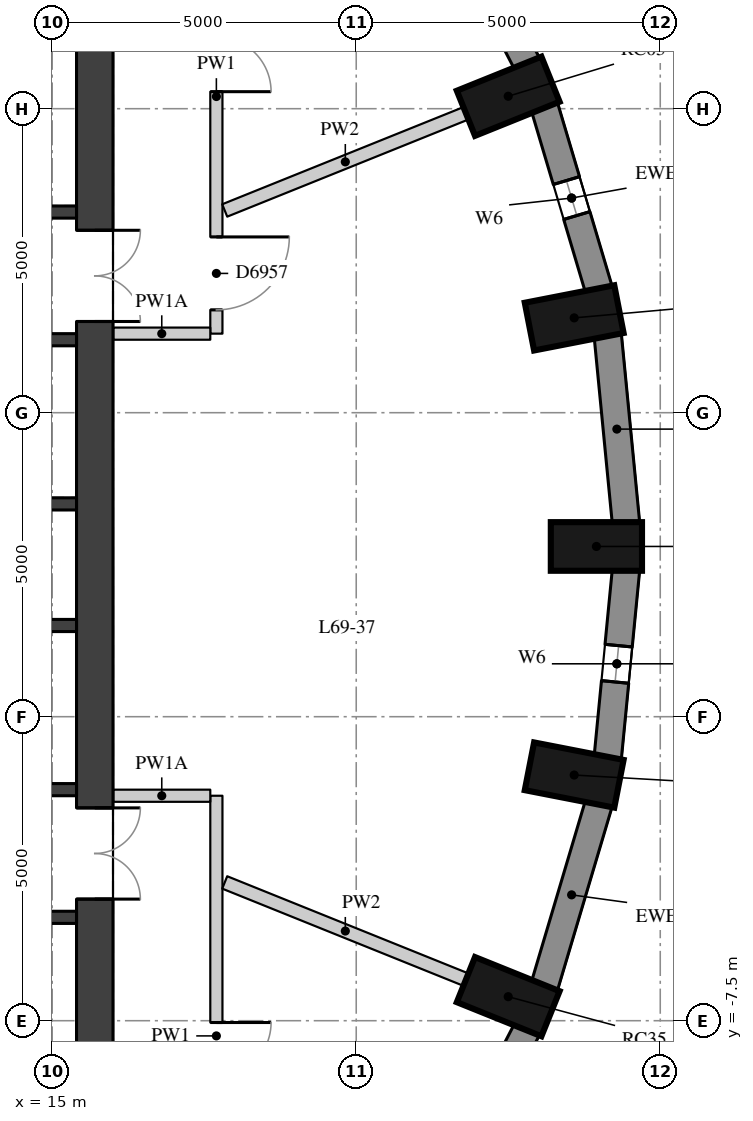
"""IFC4 building model, lengths in metres.
Left out: names, types, materials, properties, quantities, classifications, styles, units other than length and angle.
Written with IfcOpenShell. Run it as: python <this file> out.ifc"""

import sys

from ifc_helpers import new_model, si_unit, direction, frame, frame_2d, origin, origin_2d, place, context, subcontext, project, spatial, rectangle, extrude, element, fill, save


model = new_model("IFC4")
c1 = context("Model", 3, precision=1e-05, world=origin(), true_north=direction((0.0, 1.0)))
c2 = subcontext(c1, "Body", "Model", "MODEL_VIEW")
j1 = project(units=[si_unit("LENGTHUNIT", "METRE"), si_unit("PLANEANGLEUNIT", "RADIAN")], contexts=[c1])
p1 = place(None, origin())
s1 = spatial("IfcSite", under=j1, at=p1, CompositionType="ELEMENT")
p2 = place(p1, origin())
s2 = spatial("IfcBuilding", under=s1, at=p2, CompositionType="ELEMENT")
p3 = place(p2, frame((0.0, 0.0, 243.2)))
s3 = spatial("IfcBuildingStorey", under=s2, at=p3, CompositionType="ELEMENT", Elevation=243.2)
for number, where, z_axis, x_axis in (
    (1, (23.95, 0.3, 0.0), (0.0, 0.0, 1.0), (1.0, 0.0, 0.0)),
    (2, (23.585, 4.06, 0.0), (0.0, 0.0, 1.0), (0.981, 0.192, 0.0)),
    (3, (22.5, 7.705, 0.0), (0.0, 0.0, 1.0), (0.928, 0.374, 0.0)),
    (4, (22.5, -7.105, 0.0), (0.0, 0.0, 1.0), (0.928, -0.374, 0.0)),
    (5, (23.585, -3.459, 0.0), (0.0, 0.0, 1.0), (0.981, -0.192, 0.0)),
):
    element("IfcColumn", number, at=place(p3, frame(where, z_axis=z_axis, x_axis=x_axis)), inside=s3, PredefinedType="COLUMN", context=c2, shape_type="SweptSolid", body=[
        extrude(rectangle(XDim=1.5, YDim=0.8, at=origin_2d()), origin(), (0.0, 0.0, 1.0), 3.3),
    ])
p4 = place(p3, frame((24.437, 0.68, 0.0), z_axis=(0.0, 0.0, 1.0), x_axis=(-0.096740086873, 0.995309678237, 0.0)))
e6 = element("IfcWall", 6, at=p4, inside=s3, PredefinedType="SOLIDWALL", context=c2, shape_type="SweptSolid", body=[
    extrude(rectangle(XDim=3.114, YDim=0.45, at=frame_2d((1.557, 0.0))), origin(), (0.0, 0.0, 1.0), 3.02),
])
p5 = place(p3, frame((23.99, 4.526, 0.0), z_axis=(0.0, 0.0, 1.0), x_axis=(-0.285263800865, 0.958449040855, 0.0)))
e7 = element("IfcWall", 7, at=p5, inside=s3, PredefinedType="SOLIDWALL", context=c2, shape_type="SweptSolid", body=[
    extrude(rectangle(XDim=3.139, YDim=0.45, at=frame_2d((1.57, 0.0))), origin(), (0.0, 0.0, 1.0), 3.02),
])
p6 = place(p5, frame((1.27, 0.0, 0.4)))
e8 = element("IfcOpeningElement", 8, at=p6, cuts=e7, PredefinedType="OPENING", context=c2, shape_type="SweptSolid", body=[
    extrude(rectangle(XDim=0.6, YDim=1.75, at=frame_2d((0.3, 0.875))), frame((0.0, 0.235, 0.0), z_axis=(0.0, -1.0, 0.0), x_axis=(1.0, 0.0, 0.0)), (0.0, 0.0, 1.0), 0.47),
])
p7 = place(p3, frame((22.81, 8.24, 0.0), z_axis=(0.0, 0.0, 1.0), x_axis=(-0.459889857669, 0.887975967475, 0.0)))
e9 = element("IfcWall", 9, at=p7, inside=s3, PredefinedType="SOLIDWALL", context=c2, shape_type="SweptSolid", body=[
    extrude(rectangle(XDim=3.186, YDim=0.45, at=frame_2d((1.593, 0.0))), origin(), (0.0, 0.0, 1.0), 3.02),
])
p8 = place(p3, frame((21.345, -10.468, 0.0), z_axis=(0.0, 0.0, 1.0), x_axis=(0.459921155255, 0.887959757505, 0.0)))
e10 = element("IfcWall", 10, at=p8, inside=s3, PredefinedType="SOLIDWALL", context=c2, shape_type="SweptSolid", body=[
    extrude(rectangle(XDim=3.186, YDim=0.45, at=frame_2d((1.593, 0.0))), origin(), (0.0, 0.0, 1.0), 3.02),
])
p9 = place(p8, frame((1.293, 0.0, 0.4)))
e11 = element("IfcOpeningElement", 11, at=p9, cuts=e10, PredefinedType="OPENING", context=c2, shape_type="SweptSolid", body=[
    extrude(rectangle(XDim=0.6, YDim=1.75, at=frame_2d((0.3, 0.875))), frame((0.0, 0.235, 0.0), z_axis=(0.0, -1.0, 0.0), x_axis=(1.0, 0.0, 0.0)), (0.0, 0.0, 1.0), 0.47),
])
p10 = place(p3, frame((23.094, -6.935, 0.0), z_axis=(0.0, 0.0, 1.0), x_axis=(0.285263800865, 0.958449040855, 0.0)))
e12 = element("IfcWall", 12, at=p10, inside=s3, PredefinedType="SOLIDWALL", context=c2, shape_type="SweptSolid", body=[
    extrude(rectangle(XDim=3.139, YDim=0.45, at=frame_2d((1.57, 0.0))), origin(), (0.0, 0.0, 1.0), 3.02),
])
p11 = place(p3, frame((24.136, -3.18, 0.0), z_axis=(0.0, 0.0, 1.0), x_axis=(0.09673253904, 0.995310411827, 0.0)))
e13 = element("IfcWall", 13, at=p11, inside=s3, PredefinedType="SOLIDWALL", context=c2, shape_type="SweptSolid", body=[
    extrude(rectangle(XDim=3.115, YDim=0.45, at=frame_2d((1.557, 0.0))), origin(), (0.0, 0.0, 1.0), 3.02),
])
p12 = place(p11, frame((1.257, 0.0, 0.4)))
e14 = element("IfcOpeningElement", 14, at=p12, cuts=e13, PredefinedType="OPENING", context=c2, shape_type="SweptSolid", body=[
    extrude(rectangle(XDim=0.6, YDim=1.75, at=frame_2d((0.3, 0.875))), frame((0.0, 0.235, 0.0), z_axis=(0.0, -1.0, 0.0), x_axis=(1.0, 0.0, 0.0)), (0.0, 0.0, 1.0), 0.47),
])
p13 = place(p3, frame((15.7, -9.4, 0.0), z_axis=(0.0, 0.0, 1.0), x_axis=(0.0, 1.0, 0.0)))
e15 = element("IfcWall", 15, at=p13, inside=s3, PredefinedType="SHEAR", context=c2, shape_type="SweptSolid", body=[
    extrude(rectangle(XDim=18.8, YDim=0.6, at=frame_2d((9.4, 0.0))), origin(), (0.0, 0.0, 1.0), 3.02),
])
p14 = place(p13, frame((13.4, 0.0, 0.0)))
e16 = element("IfcOpeningElement", 16, at=p14, cuts=e15, PredefinedType="OPENING", context=c2, shape_type="SweptSolid", body=[
    extrude(rectangle(XDim=1.5, YDim=2.1, at=frame_2d((0.75, 1.05))), frame((0.0, 0.31, 0.0), z_axis=(0.0, -1.0, 0.0), x_axis=(1.0, 0.0, 0.0)), (0.0, 0.0, 1.0), 0.62),
])
p15 = place(p13, frame((3.9, 0.0, 0.0)))
e17 = element("IfcOpeningElement", 17, at=p15, cuts=e15, PredefinedType="OPENING", context=c2, shape_type="SweptSolid", body=[
    extrude(rectangle(XDim=1.5, YDim=2.1, at=frame_2d((0.75, 1.05))), frame((0.0, 0.31, 0.0), z_axis=(0.0, -1.0, 0.0), x_axis=(1.0, 0.0, 0.0)), (0.0, 0.0, 1.0), 0.62),
])
p16 = place(p3, frame((4.6, 5.8, 0.0), z_axis=(0.0, 0.0, 1.0), x_axis=(1.0, 0.0, 0.0)))
e18 = element("IfcWall", 18, at=p16, inside=s3, PredefinedType="SHEAR", context=c2, shape_type="SweptSolid", body=[
    extrude(rectangle(XDim=10.8, YDim=0.2, at=frame_2d((5.4, 0.0))), origin(), (0.0, 0.0, 1.0), 3.02),
])
p17 = place(p16, frame((7.05, 0.0, 0.0)))
e19 = element("IfcOpeningElement", 19, at=p17, cuts=e18, PredefinedType="OPENING", context=c2, shape_type="SweptSolid", body=[
    extrude(rectangle(XDim=1.1, YDim=2.1, at=frame_2d((0.55, 1.05))), frame((0.0, 0.11, 0.0), z_axis=(0.0, -1.0, 0.0), x_axis=(1.0, 0.0, 0.0)), (0.0, 0.0, 1.0), 0.22),
])
p18 = place(p16, frame((9.05, 0.0, 0.0)))
e20 = element("IfcOpeningElement", 20, at=p18, cuts=e18, PredefinedType="OPENING", context=c2, shape_type="SweptSolid", body=[
    extrude(rectangle(XDim=1.1, YDim=2.1, at=frame_2d((0.55, 1.05))), frame((0.0, 0.11, 0.0), z_axis=(0.0, -1.0, 0.0), x_axis=(1.0, 0.0, 0.0)), (0.0, 0.0, 1.0), 0.22),
])
p19 = place(p3, frame((4.6, 3.7, 0.0), z_axis=(0.0, 0.0, 1.0), x_axis=(1.0, 0.0, 0.0)))
e21 = element("IfcWall", 21, at=p19, inside=s3, PredefinedType="SHEAR", context=c2, shape_type="SweptSolid", body=[
    extrude(rectangle(XDim=10.8, YDim=0.2, at=frame_2d((5.4, 0.0))), origin(), (0.0, 0.0, 1.0), 3.02),
])
p20 = place(p19, frame((6.6, 0.0, 0.0)))
e22 = element("IfcOpeningElement", 22, at=p20, cuts=e21, PredefinedType="OPENING", context=c2, shape_type="SweptSolid", body=[
    extrude(rectangle(XDim=1.1, YDim=2.1, at=frame_2d((0.55, 1.05))), frame((0.0, 0.11, 0.0), z_axis=(0.0, -1.0, 0.0), x_axis=(1.0, 0.0, 0.0)), (0.0, 0.0, 1.0), 0.22),
])
p21 = place(p19, frame((8.9, 0.0, 0.0)))
e23 = element("IfcOpeningElement", 23, at=p21, cuts=e21, PredefinedType="OPENING", context=c2, shape_type="SweptSolid", body=[
    extrude(rectangle(XDim=1.1, YDim=2.1, at=frame_2d((0.55, 1.05))), frame((0.0, 0.11, 0.0), z_axis=(0.0, -1.0, 0.0), x_axis=(1.0, 0.0, 0.0)), (0.0, 0.0, 1.0), 0.22),
])
for number, where, z_axis, x_axis in (
    (24, (4.6, 1.0, 0.0), (0.0, 0.0, 1.0), (1.0, 0.0, 0.0)),
    (25, (4.6, -1.0, 0.0), (0.0, 0.0, 1.0), (1.0, 0.0, 0.0)),
):
    element("IfcWall", number, at=place(p3, frame(where, z_axis=z_axis, x_axis=x_axis)), inside=s3, PredefinedType="SHEAR", context=c2, shape_type="SweptSolid", body=[
        extrude(rectangle(XDim=10.8, YDim=0.2, at=frame_2d((5.4, 0.0))), origin(), (0.0, 0.0, 1.0), 3.02),
    ])
p22 = place(p3, frame((4.6, -3.7, 0.0), z_axis=(0.0, 0.0, 1.0), x_axis=(1.0, 0.0, 0.0)))
e26 = element("IfcWall", 26, at=p22, inside=s3, PredefinedType="SHEAR", context=c2, shape_type="SweptSolid", body=[
    extrude(rectangle(XDim=10.8, YDim=0.2, at=frame_2d((5.4, 0.0))), origin(), (0.0, 0.0, 1.0), 3.02),
])
p23 = place(p22, frame((6.6, 0.0, 0.0)))
e27 = element("IfcOpeningElement", 27, at=p23, cuts=e26, PredefinedType="OPENING", context=c2, shape_type="SweptSolid", body=[
    extrude(rectangle(XDim=1.1, YDim=2.1, at=frame_2d((0.55, 1.05))), frame((0.0, 0.11, 0.0), z_axis=(0.0, -1.0, 0.0), x_axis=(1.0, 0.0, 0.0)), (0.0, 0.0, 1.0), 0.22),
])
p24 = place(p22, frame((8.9, 0.0, 0.0)))
e28 = element("IfcOpeningElement", 28, at=p24, cuts=e26, PredefinedType="OPENING", context=c2, shape_type="SweptSolid", body=[
    extrude(rectangle(XDim=1.1, YDim=2.1, at=frame_2d((0.55, 1.05))), frame((0.0, 0.11, 0.0), z_axis=(0.0, -1.0, 0.0), x_axis=(1.0, 0.0, 0.0)), (0.0, 0.0, 1.0), 0.22),
])
p25 = place(p3, frame((4.6, -5.8, 0.0), z_axis=(0.0, 0.0, 1.0), x_axis=(1.0, 0.0, 0.0)))
e29 = element("IfcWall", 29, at=p25, inside=s3, PredefinedType="SHEAR", context=c2, shape_type="SweptSolid", body=[
    extrude(rectangle(XDim=10.8, YDim=0.2, at=frame_2d((5.4, 0.0))), origin(), (0.0, 0.0, 1.0), 3.02),
])
p26 = place(p3, frame((17.7, -3.8, 0.0), z_axis=(0.0, 0.0, 1.0), x_axis=(0.0, -1.0, 0.0)))
e30 = element("IfcWall", 30, at=p26, inside=s3, PredefinedType="PARTITIONING", context=c2, shape_type="SweptSolid", body=[
    extrude(rectangle(XDim=7.9, YDim=0.2, at=frame_2d((3.95, 0.0))), origin(), (0.0, 0.0, 1.0), 3.02),
])
p27 = place(p26, frame((3.73, 0.0, 0.0)))
e31 = element("IfcOpeningElement", 31, at=p27, cuts=e30, PredefinedType="OPENING", context=c2, shape_type="SweptSolid", body=[
    extrude(rectangle(XDim=1.8, YDim=2.1, at=frame_2d((0.9, 1.05))), frame((0.0, 0.11, 0.0), z_axis=(0.0, -1.0, 0.0), x_axis=(1.0, 0.0, 0.0)), (0.0, 0.0, 1.0), 0.22),
])
p28 = place(p3, frame((17.7, 11.6, 0.0), z_axis=(0.0, 0.0, 1.0), x_axis=(0.0, -1.0, 0.0)))
e32 = element("IfcWall", 32, at=p28, inside=s3, PredefinedType="PARTITIONING", context=c2, shape_type="SweptSolid", body=[
    extrude(rectangle(XDim=7.8, YDim=0.2, at=frame_2d((3.9, 0.0))), origin(), (0.0, 0.0, 1.0), 3.02),
])
p29 = place(p28, frame((6.209, 0.0, 0.0)))
e33 = element("IfcOpeningElement", 33, at=p29, cuts=e32, PredefinedType="OPENING", context=c2, shape_type="SweptSolid", body=[
    extrude(rectangle(XDim=1.2, YDim=2.1, at=frame_2d((0.6, 1.05))), frame((0.0, 0.11, 0.0), z_axis=(0.0, -1.0, 0.0), x_axis=(1.0, 0.0, 0.0)), (0.0, 0.0, 1.0), 0.22),
])
p30 = place(p28, frame((2.02, 0.0, 0.0)))
e34 = element("IfcOpeningElement", 34, at=p30, cuts=e32, PredefinedType="OPENING", context=c2, shape_type="SweptSolid", body=[
    extrude(rectangle(XDim=1.8, YDim=2.1, at=frame_2d((0.9, 1.05))), frame((0.0, 0.11, 0.0), z_axis=(0.0, -1.0, 0.0), x_axis=(1.0, 0.0, 0.0)), (0.0, 0.0, 1.0), 0.22),
])
for number, where, z_axis, x_axis in (
    (35, (17.6, 3.8, 0.0), (0.0, 0.0, 1.0), (-1.0, 0.0, 0.0)),
    (36, (16.004, -3.8, 0.0), (0.0, 0.0, 1.0), (1.0, 0.0, 0.0)),
):
    element("IfcWall", number, at=place(p3, frame(where, z_axis=z_axis, x_axis=x_axis)), inside=s3, PredefinedType="PARTITIONING", context=c2, shape_type="SweptSolid", body=[
        extrude(rectangle(XDim=1.596, YDim=0.2, at=frame_2d((0.798, 0.0))), origin(), (0.0, 0.0, 1.0), 2.57),
    ])
for number, where, z_axis, x_axis in (
    (37, (21.804, 7.424, 0.0), (0.0, 0.0, 1.0), (-0.928, -0.374, 0.0)),
    (38, (21.804, -6.824, 0.0), (0.0, 0.0, 1.0), (-0.928, 0.374, 0.0)),
):
    element("IfcWall", number, at=place(p3, frame(where, z_axis=z_axis, x_axis=x_axis)), inside=s3, PredefinedType="PARTITIONING", context=c2, shape_type="SweptSolid", body=[
        extrude(rectangle(XDim=4.277, YDim=0.22, at=frame_2d((2.138, 0.0))), origin(), (0.0, 0.0, 1.0), 3.02),
    ])
p31 = place(p6, origin())
e39 = element("IfcWindow", 39, at=p31, inside=s3, PartitioningType="SINGLE_PANEL", PredefinedType="WINDOW", context=c2, shape_type="SweptSolid", body=[
    extrude(rectangle(XDim=0.6, YDim=1.75, at=frame_2d((0.3, 0.875))), frame((0.0, 0.035, 0.0), z_axis=(0.0, -1.0, 0.0), x_axis=(1.0, 0.0, 0.0)), (0.0, 0.0, 1.0), 0.06),
])
fill(e8, e39)
p32 = place(p12, origin())
e40 = element("IfcWindow", 40, at=p32, inside=s3, PartitioningType="SINGLE_PANEL", PredefinedType="WINDOW", context=c2, shape_type="SweptSolid", body=[
    extrude(rectangle(XDim=0.6, YDim=1.75, at=frame_2d((0.3, 0.875))), frame((0.0, 0.035, 0.0), z_axis=(0.0, -1.0, 0.0), x_axis=(1.0, 0.0, 0.0)), (0.0, 0.0, 1.0), 0.06),
])
fill(e14, e40)
p33 = place(p14, origin())
e41 = element("IfcDoor", 41, at=p33, inside=s3, OperationType="DOUBLE_DOOR_SINGLE_SWING", PredefinedType="DOOR", context=c2, shape_type="SweptSolid", body=[
    extrude(rectangle(XDim=1.5, YDim=2.1, at=frame_2d((0.75, 1.05))), frame((0.0, 0.025, 0.0), z_axis=(0.0, -1.0, 0.0), x_axis=(1.0, 0.0, 0.0)), (0.0, 0.0, 1.0), 0.05),
])
fill(e16, e41)
p34 = place(p15, origin())
e42 = element("IfcDoor", 42, at=p34, inside=s3, OperationType="DOUBLE_DOOR_SINGLE_SWING", PredefinedType="DOOR", context=c2, shape_type="SweptSolid", body=[
    extrude(rectangle(XDim=1.5, YDim=2.1, at=frame_2d((0.75, 1.05))), frame((0.0, 0.025, 0.0), z_axis=(0.0, -1.0, 0.0), x_axis=(1.0, 0.0, 0.0)), (0.0, 0.0, 1.0), 0.05),
])
fill(e17, e42)
p35 = place(p27, origin())
e43 = element("IfcDoor", 43, at=p35, inside=s3, OperationType="DOUBLE_DOOR_SINGLE_SWING", PredefinedType="DOOR", context=c2, shape_type="SweptSolid", body=[
    extrude(rectangle(XDim=1.8, YDim=2.1, at=frame_2d((0.9, 1.05))), frame((0.0, 0.025, 0.0), z_axis=(0.0, -1.0, 0.0), x_axis=(1.0, 0.0, 0.0)), (0.0, 0.0, 1.0), 0.05),
])
fill(e31, e43)
p36 = place(p29, origin())
e44 = element("IfcDoor", 44, at=p36, inside=s3, OperationType="SINGLE_SWING_LEFT", PredefinedType="DOOR", context=c2, shape_type="SweptSolid", body=[
    extrude(rectangle(XDim=1.2, YDim=2.1, at=frame_2d((0.6, 1.05))), frame((0.0, 0.025, 0.0), z_axis=(0.0, -1.0, 0.0), x_axis=(1.0, 0.0, 0.0)), (0.0, 0.0, 1.0), 0.05),
])
fill(e33, e44)
p37 = place(p30, origin())
e45 = element("IfcDoor", 45, at=p37, inside=s3, OperationType="DOUBLE_DOOR_SINGLE_SWING", PredefinedType="DOOR", context=c2, shape_type="SweptSolid", body=[
    extrude(rectangle(XDim=1.8, YDim=2.1, at=frame_2d((0.9, 1.05))), frame((0.0, 0.025, 0.0), z_axis=(0.0, -1.0, 0.0), x_axis=(1.0, 0.0, 0.0)), (0.0, 0.0, 1.0), 0.05),
])
fill(e34, e45)
save(model, sys.argv[1])
